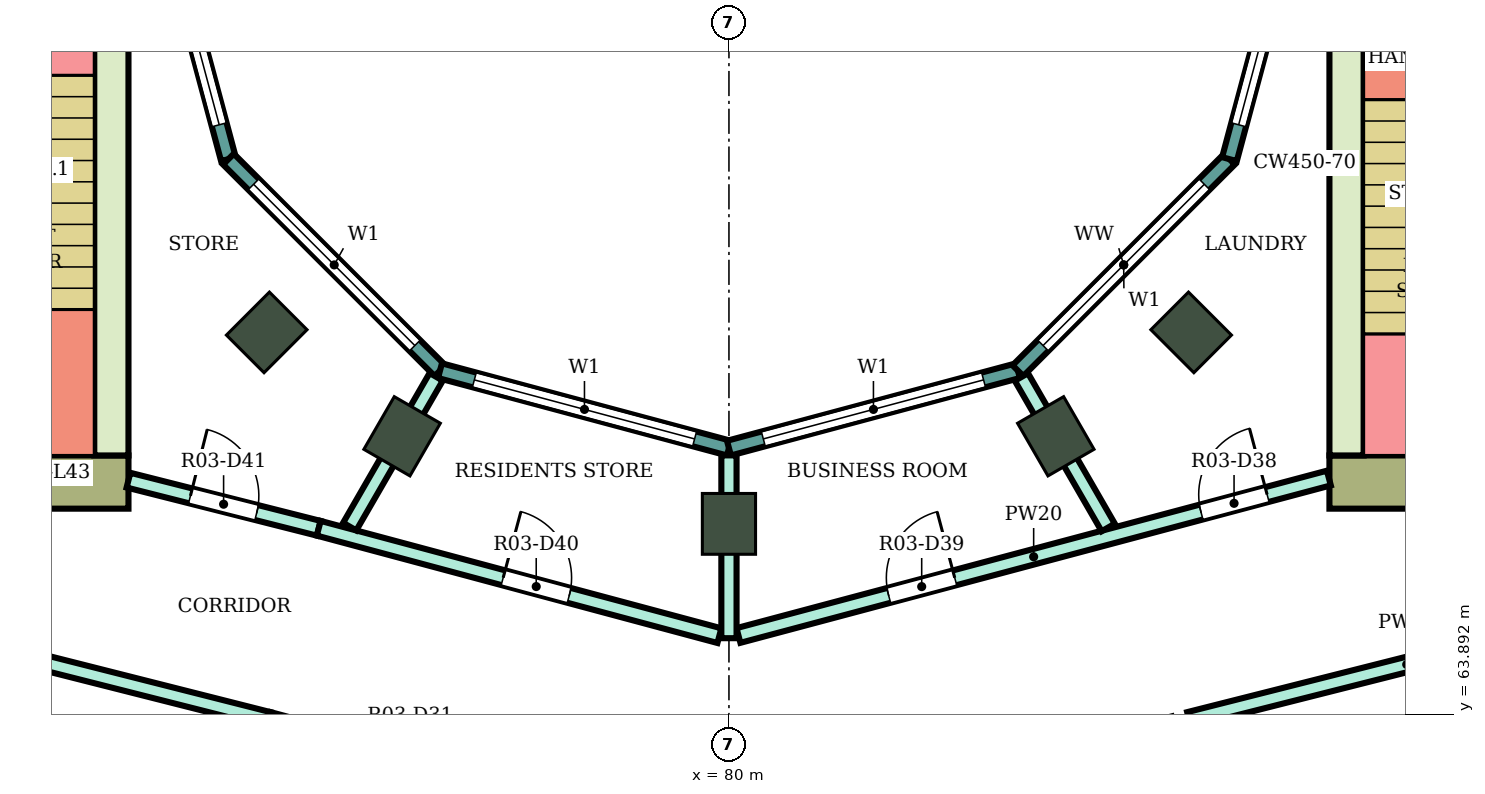
"""IFC4 building model, lengths in metres.
Left out: names, types, materials, properties, quantities, classifications, styles, units other than length and angle.
Written with IfcOpenShell. Run it as: python <this file> out.ifc"""

import sys

from ifc_helpers import new_model, si_unit, direction, frame, frame_2d, origin, origin_2d, place, context, subcontext, project, spatial, rectangle, extrude, element, fill, save


model = new_model("IFC4")
c1 = context("Model", 3, precision=1e-05, world=origin(), true_north=direction((0.0, 1.0)))
c2 = subcontext(c1, "Body", "Model", "MODEL_VIEW")
j1 = project(units=[si_unit("LENGTHUNIT", "METRE"), si_unit("PLANEANGLEUNIT", "RADIAN")], contexts=[c1])
p1 = place(None, origin())
s1 = spatial("IfcSite", under=j1, at=p1, CompositionType="ELEMENT")
p2 = place(p1, origin())
s2 = spatial("IfcBuilding", under=s1, at=p2, CompositionType="ELEMENT")
p3 = place(p2, frame((0.0, 0.0, 186.4)))
s3 = spatial("IfcBuildingStorey", under=s2, at=p3, CompositionType="ELEMENT", Elevation=186.4)
for number, where, z_axis, x_axis in (
    (1, (73.919, 68.919, 0.0), (0.0, 0.0, 1.0), (-0.707, -0.707, 0.0)),
    (2, (75.7, 67.552, 0.0), (0.0, 0.0, 1.0), (-0.5, -0.866, 0.0)),
    (3, (80.0, 66.4, 0.0), (0.0, 0.0, 1.0), (0.0, -1.0, 0.0)),
    (4, (84.3, 67.552, 0.0), (0.0, 0.0, 1.0), (0.5, -0.866, 0.0)),
    (5, (86.081, 68.919, 0.0), (0.0, 0.0, 1.0), (0.707, -0.707, 0.0)),
):
    element("IfcColumn", number, at=place(p3, frame(where, z_axis=z_axis, x_axis=x_axis)), inside=s3, PredefinedType="COLUMN", context=c2, shape_type="SweptSolid", body=[
        extrude(rectangle(XDim=0.8, YDim=0.7, at=origin_2d()), origin(), (0.0, 0.0, 1.0), 4.1),
    ])
p4 = place(p3, frame((87.9, 66.95, 0.0), z_axis=(0.0, 0.0, 1.0), x_axis=(1.0, 0.0, 0.0)))
e6 = element("IfcWall", 6, at=p4, inside=s3, PredefinedType="SHEAR", context=c2, shape_type="SweptSolid", body=[
    extrude(rectangle(XDim=14.8, YDim=0.7, at=frame_2d((7.4, 0.0))), origin(), (0.0, 0.0, 1.0), 3.78),
])
p5 = place(p4, frame((4.2, 0.0, 0.0)))
e7 = element("IfcOpeningElement", 7, at=p5, cuts=e6, PredefinedType="OPENING", context=c2, shape_type="SweptSolid", body=[
    extrude(rectangle(XDim=2.4, YDim=2.4, at=frame_2d((1.2, 1.2))), frame((0.0, 0.36, 0.0), z_axis=(0.0, -1.0, 0.0), x_axis=(1.0, 0.0, 0.0)), (0.0, 0.0, 1.0), 0.72),
])
p6 = place(p3, frame((88.125, 67.3, 0.0), z_axis=(0.0, 0.0, 1.0), x_axis=(0.0, 1.0, 0.0)))
e8 = element("IfcWall", 8, at=p6, inside=s3, PredefinedType="SHEAR", context=c2, shape_type="SweptSolid", body=[
    extrude(rectangle(XDim=7.7, YDim=0.45, at=frame_2d((3.85, 0.0))), origin(), (0.0, 0.0, 1.0), 3.78),
])
p7 = place(p3, frame((72.1, 66.95, 0.0), z_axis=(0.0, 0.0, 1.0), x_axis=(-1.0, 0.0, 0.0)))
e9 = element("IfcWall", 9, at=p7, inside=s3, PredefinedType="SHEAR", context=c2, shape_type="SweptSolid", body=[
    extrude(rectangle(XDim=14.8, YDim=0.7, at=frame_2d((7.4, 0.0))), origin(), (0.0, 0.0, 1.0), 3.78),
])
p8 = place(p7, frame((4.2, 0.0, 0.0)))
e10 = element("IfcOpeningElement", 10, at=p8, cuts=e9, PredefinedType="OPENING", context=c2, shape_type="SweptSolid", body=[
    extrude(rectangle(XDim=2.4, YDim=2.4, at=frame_2d((1.2, 1.2))), frame((0.0, 0.36, 0.0), z_axis=(0.0, -1.0, 0.0), x_axis=(1.0, 0.0, 0.0)), (0.0, 0.0, 1.0), 0.72),
])
p9 = place(p3, frame((71.875, 75.0, 0.0), z_axis=(0.0, 0.0, 1.0), x_axis=(0.0, -1.0, 0.0)))
e11 = element("IfcWall", 11, at=p9, inside=s3, PredefinedType="SHEAR", context=c2, shape_type="SweptSolid", body=[
    extrude(rectangle(XDim=7.7, YDim=0.45, at=frame_2d((3.85, 0.0))), origin(), (0.0, 0.0, 1.0), 3.78),
])
p10 = place(p3, frame((72.396, 75.0, 0.0), z_axis=(0.0, 0.0, 1.0), x_axis=(0.258789828301, -0.965933654434, 0.0)))
e12 = element("IfcWall", 12, at=p10, inside=s3, PredefinedType="NOTDEFINED", context=c2, shape_type="SweptSolid", body=[
    extrude(rectangle(XDim=3.936, YDim=0.2, at=frame_2d((1.968, 0.0))), origin(), (0.0, 0.0, 1.0), 4.1),
])
p11 = place(p10, frame((0.468, 0.0, 0.9)))
e13 = element("IfcOpeningElement", 13, at=p11, cuts=e12, PredefinedType="OPENING", context=c2, shape_type="SweptSolid", body=[
    extrude(rectangle(XDim=3.0, YDim=2.3, at=frame_2d((1.5, 1.15))), frame((0.0, 0.11, 0.0), z_axis=(0.0, -1.0, 0.0), x_axis=(1.0, 0.0, 0.0)), (0.0, 0.0, 1.0), 0.22),
])
p12 = place(p3, frame((73.415, 71.198, 0.0), z_axis=(0.0, 0.0, 1.0), x_axis=(0.707106781187, -0.707106781187, 0.0)))
e14 = element("IfcWall", 14, at=p12, inside=s3, PredefinedType="NOTDEFINED", context=c2, shape_type="SweptSolid", body=[
    extrude(rectangle(XDim=3.936, YDim=0.2, at=frame_2d((1.968, 0.0))), origin(), (0.0, 0.0, 1.0), 4.1),
])
p13 = place(p12, frame((0.468, 0.0, 0.9)))
e15 = element("IfcOpeningElement", 15, at=p13, cuts=e14, PredefinedType="OPENING", context=c2, shape_type="SweptSolid", body=[
    extrude(rectangle(XDim=3.0, YDim=2.3, at=frame_2d((1.5, 1.15))), frame((0.0, 0.11, 0.0), z_axis=(0.0, -1.0, 0.0), x_axis=(1.0, 0.0, 0.0)), (0.0, 0.0, 1.0), 0.22),
])
p14 = place(p3, frame((76.198, 68.415, 0.0), z_axis=(0.0, 0.0, 1.0), x_axis=(0.965933654434, -0.258789828301, 0.0)))
e16 = element("IfcWall", 16, at=p14, inside=s3, PredefinedType="NOTDEFINED", context=c2, shape_type="SweptSolid", body=[
    extrude(rectangle(XDim=3.936, YDim=0.2, at=frame_2d((1.968, 0.0))), origin(), (0.0, 0.0, 1.0), 4.1),
])
p15 = place(p14, frame((0.468, 0.0, 0.9)))
e17 = element("IfcOpeningElement", 17, at=p15, cuts=e16, PredefinedType="OPENING", context=c2, shape_type="SweptSolid", body=[
    extrude(rectangle(XDim=3.0, YDim=2.3, at=frame_2d((1.5, 1.15))), frame((0.0, 0.11, 0.0), z_axis=(0.0, -1.0, 0.0), x_axis=(1.0, 0.0, 0.0)), (0.0, 0.0, 1.0), 0.22),
])
p16 = place(p3, frame((80.0, 67.396, 0.0), z_axis=(0.0, 0.0, 1.0), x_axis=(0.965933654434, 0.258789828301, 0.0)))
e18 = element("IfcWall", 18, at=p16, inside=s3, PredefinedType="NOTDEFINED", context=c2, shape_type="SweptSolid", body=[
    extrude(rectangle(XDim=3.936, YDim=0.2, at=frame_2d((1.968, 0.0))), origin(), (0.0, 0.0, 1.0), 4.1),
])
p17 = place(p16, frame((0.468, 0.0, 0.9)))
e19 = element("IfcOpeningElement", 19, at=p17, cuts=e18, PredefinedType="OPENING", context=c2, shape_type="SweptSolid", body=[
    extrude(rectangle(XDim=3.0, YDim=2.3, at=frame_2d((1.5, 1.15))), frame((0.0, 0.11, 0.0), z_axis=(0.0, -1.0, 0.0), x_axis=(1.0, 0.0, 0.0)), (0.0, 0.0, 1.0), 0.22),
])
p18 = place(p3, frame((83.802, 68.415, 0.0), z_axis=(0.0, 0.0, 1.0), x_axis=(0.707106781187, 0.707106781187, 0.0)))
e20 = element("IfcWall", 20, at=p18, inside=s3, PredefinedType="NOTDEFINED", context=c2, shape_type="SweptSolid", body=[
    extrude(rectangle(XDim=3.936, YDim=0.2, at=frame_2d((1.968, 0.0))), origin(), (0.0, 0.0, 1.0), 4.1),
])
p19 = place(p18, frame((0.468, 0.0, 0.9)))
e21 = element("IfcOpeningElement", 21, at=p19, cuts=e20, PredefinedType="OPENING", context=c2, shape_type="SweptSolid", body=[
    extrude(rectangle(XDim=3.0, YDim=2.3, at=frame_2d((1.5, 1.15))), frame((0.0, 0.11, 0.0), z_axis=(0.0, -1.0, 0.0), x_axis=(1.0, 0.0, 0.0)), (0.0, 0.0, 1.0), 0.22),
])
p20 = place(p3, frame((86.585, 71.198, 0.0), z_axis=(0.0, 0.0, 1.0), x_axis=(0.258789828301, 0.965933654434, 0.0)))
e22 = element("IfcWall", 22, at=p20, inside=s3, PredefinedType="NOTDEFINED", context=c2, shape_type="SweptSolid", body=[
    extrude(rectangle(XDim=3.936, YDim=0.2, at=frame_2d((1.968, 0.0))), origin(), (0.0, 0.0, 1.0), 4.1),
])
p21 = place(p20, frame((0.468, 0.0, 0.9)))
e23 = element("IfcOpeningElement", 23, at=p21, cuts=e22, PredefinedType="OPENING", context=c2, shape_type="SweptSolid", body=[
    extrude(rectangle(XDim=3.0, YDim=2.3, at=frame_2d((1.5, 1.15))), frame((0.0, 0.11, 0.0), z_axis=(0.0, -1.0, 0.0), x_axis=(1.0, 0.0, 0.0)), (0.0, 0.0, 1.0), 0.22),
])
p22 = place(p3, frame((69.899, 64.85, 0.0), z_axis=(0.0, 0.0, 1.0), x_axis=(0.969429930153, -0.245368316057, 0.0)))
e24 = element("IfcWall", 24, at=p22, inside=s3, PredefinedType="PARTITIONING", context=c2, shape_type="SweptSolid", body=[
    extrude(rectangle(XDim=4.176, YDim=0.2, at=frame_2d((2.088, 0.0))), origin(), (0.0, 0.0, 1.0), 3.65),
])
p23 = place(p3, frame((72.1, 66.975, 0.0), z_axis=(0.0, 0.0, 1.0), x_axis=(0.969471314457, -0.245204752086, 0.0)))
e25 = element("IfcWall", 25, at=p23, inside=s3, PredefinedType="PARTITIONING", context=c2, shape_type="SweptSolid", body=[
    extrude(rectangle(XDim=2.582, YDim=0.2, at=frame_2d((1.291, 0.0))), origin(), (0.0, 0.0, 1.0), 3.65),
])
p24 = place(p23, frame((0.841, 0.0, 0.0)))
e26 = element("IfcOpeningElement", 26, at=p24, cuts=e25, PredefinedType="OPENING", context=c2, shape_type="SweptSolid", body=[
    extrude(rectangle(XDim=0.9, YDim=2.1, at=frame_2d((0.45, 1.05))), frame((0.0, 0.11, 0.0), z_axis=(0.0, -1.0, 0.0), x_axis=(1.0, 0.0, 0.0)), (0.0, 0.0, 1.0), 0.22),
])
p25 = place(p3, frame((73.947, 63.826, 0.0), z_axis=(0.0, 0.0, 1.0), x_axis=(0.965898432367, -0.258921258979, 0.0)))
e27 = element("IfcWall", 27, at=p25, inside=s3, PredefinedType="PARTITIONING", context=c2, shape_type="SweptSolid", body=[
    extrude(rectangle(XDim=6.217, YDim=0.2, at=frame_2d((3.108, 0.0))), origin(), (0.0, 0.0, 1.0), 3.65),
])
p26 = place(p25, frame((1.424, 0.0, 0.0)))
e28 = element("IfcOpeningElement", 28, at=p26, cuts=e27, PredefinedType="OPENING", context=c2, shape_type="SweptSolid", body=[
    extrude(rectangle(XDim=1.0, YDim=2.1, at=frame_2d((0.5, 1.05))), frame((0.0, 0.11, 0.0), z_axis=(0.0, -1.0, 0.0), x_axis=(1.0, 0.0, 0.0)), (0.0, 0.0, 1.0), 0.22),
])
p27 = place(p3, frame((74.603, 66.342, 0.0), z_axis=(0.0, 0.0, 1.0), x_axis=(0.965920893652, -0.258837453254, 0.0)))
e29 = element("IfcWall", 29, at=p27, inside=s3, PredefinedType="PARTITIONING", context=c2, shape_type="SweptSolid", body=[
    extrude(rectangle(XDim=5.458, YDim=0.2, at=frame_2d((2.729, 0.0))), origin(), (0.0, 0.0, 1.0), 3.65),
])
p28 = place(p27, frame((2.512, 0.0, 0.0)))
e30 = element("IfcOpeningElement", 30, at=p28, cuts=e29, PredefinedType="OPENING", context=c2, shape_type="SweptSolid", body=[
    extrude(rectangle(XDim=0.9, YDim=2.1, at=frame_2d((0.45, 1.05))), frame((0.0, 0.11, 0.0), z_axis=(0.0, -1.0, 0.0), x_axis=(1.0, 0.0, 0.0)), (0.0, 0.0, 1.0), 0.22),
])
p29 = place(p3, frame((75.01, 66.364, 0.0), z_axis=(0.0, 0.0, 1.0), x_axis=(0.500097042406, 0.865969369075, 0.0)))
e31 = element("IfcWall", 31, at=p29, inside=s3, PredefinedType="PARTITIONING", context=c2, shape_type="SweptSolid", body=[
    extrude(rectangle(XDim=2.275, YDim=0.2, at=frame_2d((1.138, 0.0))), origin(), (0.0, 0.0, 1.0), 3.65),
])
p30 = place(p3, frame((80.125, 64.932, 0.0), z_axis=(0.0, 0.0, 1.0), x_axis=(0.966236955806, 0.257655089674, 0.0)))
e32 = element("IfcWall", 32, at=p30, inside=s3, PredefinedType="PARTITIONING", context=c2, shape_type="SweptSolid", body=[
    extrude(rectangle(XDim=8.039, YDim=0.2, at=frame_2d((4.02, 0.0))), origin(), (0.0, 0.0, 1.0), 3.65),
])
p31 = place(p30, frame((6.298, 0.0, 0.0)))
e33 = element("IfcOpeningElement", 33, at=p31, cuts=e32, PredefinedType="OPENING", context=c2, shape_type="SweptSolid", body=[
    extrude(rectangle(XDim=0.9, YDim=2.1, at=frame_2d((0.45, 1.05))), frame((0.0, 0.11, 0.0), z_axis=(0.0, -1.0, 0.0), x_axis=(1.0, 0.0, 0.0)), (0.0, 0.0, 1.0), 0.22),
])
p32 = place(p30, frame((2.045, 0.0, 0.0)))
e34 = element("IfcOpeningElement", 34, at=p32, cuts=e32, PredefinedType="OPENING", context=c2, shape_type="SweptSolid", body=[
    extrude(rectangle(XDim=0.9, YDim=2.1, at=frame_2d((0.45, 1.05))), frame((0.0, 0.11, 0.0), z_axis=(0.0, -1.0, 0.0), x_axis=(1.0, 0.0, 0.0)), (0.0, 0.0, 1.0), 0.22),
])
p33 = place(p3, frame((80.0, 64.896, 0.0), z_axis=(0.0, 0.0, 1.0), x_axis=(0.0, 1.0, 0.0)))
e35 = element("IfcWall", 35, at=p33, inside=s3, PredefinedType="PARTITIONING", context=c2, shape_type="SweptSolid", body=[
    extrude(rectangle(XDim=2.405, YDim=0.2, at=frame_2d((1.203, 0.0))), origin(), (0.0, 0.0, 1.0), 3.65),
])
p34 = place(p3, frame((83.847, 68.332, 0.0), z_axis=(0.0, 0.0, 1.0), x_axis=(0.499953638813, -0.866052168773, 0.0)))
e36 = element("IfcWall", 36, at=p34, inside=s3, PredefinedType="PARTITIONING", context=c2, shape_type="SweptSolid", body=[
    extrude(rectangle(XDim=2.285, YDim=0.2, at=frame_2d((1.143, 0.0))), origin(), (0.0, 0.0, 1.0), 3.65),
])
p35 = place(p3, frame((86.053, 63.826, 0.0), z_axis=(0.0, 0.0, 1.0), x_axis=(0.969490004987, 0.245130843083, 0.0)))
e37 = element("IfcWall", 37, at=p35, inside=s3, PredefinedType="PARTITIONING", context=c2, shape_type="SweptSolid", body=[
    extrude(rectangle(XDim=5.908, YDim=0.2, at=frame_2d((2.954, 0.0))), origin(), (0.0, 0.0, 1.0), 3.65),
])
p36 = place(p11, origin())
e38 = element("IfcWindow", 38, at=p36, inside=s3, PartitioningType="SINGLE_PANEL", PredefinedType="WINDOW", context=c2, shape_type="SweptSolid", body=[
    extrude(rectangle(XDim=3.0, YDim=2.3, at=frame_2d((1.5, 1.15))), frame((0.0, 0.03, 0.0), z_axis=(0.0, -1.0, 0.0), x_axis=(1.0, 0.0, 0.0)), (0.0, 0.0, 1.0), 0.06),
])
fill(e13, e38)
p37 = place(p13, origin())
e39 = element("IfcWindow", 39, at=p37, inside=s3, PartitioningType="SINGLE_PANEL", PredefinedType="WINDOW", context=c2, shape_type="SweptSolid", body=[
    extrude(rectangle(XDim=3.0, YDim=2.3, at=frame_2d((1.5, 1.15))), frame((0.0, 0.03, 0.0), z_axis=(0.0, -1.0, 0.0), x_axis=(1.0, 0.0, 0.0)), (0.0, 0.0, 1.0), 0.06),
])
fill(e15, e39)
p38 = place(p15, origin())
e40 = element("IfcWindow", 40, at=p38, inside=s3, PartitioningType="SINGLE_PANEL", PredefinedType="WINDOW", context=c2, shape_type="SweptSolid", body=[
    extrude(rectangle(XDim=3.0, YDim=2.3, at=frame_2d((1.5, 1.15))), frame((0.0, 0.03, 0.0), z_axis=(0.0, -1.0, 0.0), x_axis=(1.0, 0.0, 0.0)), (0.0, 0.0, 1.0), 0.06),
])
fill(e17, e40)
p39 = place(p17, origin())
e41 = element("IfcWindow", 41, at=p39, inside=s3, PartitioningType="SINGLE_PANEL", PredefinedType="WINDOW", context=c2, shape_type="SweptSolid", body=[
    extrude(rectangle(XDim=3.0, YDim=2.3, at=frame_2d((1.5, 1.15))), frame((0.0, 0.03, 0.0), z_axis=(0.0, -1.0, 0.0), x_axis=(1.0, 0.0, 0.0)), (0.0, 0.0, 1.0), 0.06),
])
fill(e19, e41)
p40 = place(p19, origin())
e42 = element("IfcWindow", 42, at=p40, inside=s3, PartitioningType="SINGLE_PANEL", PredefinedType="WINDOW", context=c2, shape_type="SweptSolid", body=[
    extrude(rectangle(XDim=3.0, YDim=2.3, at=frame_2d((1.5, 1.15))), frame((0.0, 0.03, 0.0), z_axis=(0.0, -1.0, 0.0), x_axis=(1.0, 0.0, 0.0)), (0.0, 0.0, 1.0), 0.06),
])
fill(e21, e42)
p41 = place(p21, origin())
e43 = element("IfcWindow", 43, at=p41, inside=s3, PartitioningType="SINGLE_PANEL", PredefinedType="WINDOW", context=c2, shape_type="SweptSolid", body=[
    extrude(rectangle(XDim=3.0, YDim=2.3, at=frame_2d((1.5, 1.15))), frame((0.0, 0.03, 0.0), z_axis=(0.0, -1.0, 0.0), x_axis=(1.0, 0.0, 0.0)), (0.0, 0.0, 1.0), 0.06),
])
fill(e23, e43)
p42 = place(p31, origin())
e44 = element("IfcDoor", 44, at=p42, inside=s3, OperationType="SINGLE_SWING_RIGHT", PredefinedType="DOOR", context=c2, shape_type="SweptSolid", body=[
    extrude(rectangle(XDim=0.9, YDim=2.1, at=frame_2d((0.45, 1.05))), frame((0.0, 0.025, 0.0), z_axis=(0.0, -1.0, 0.0), x_axis=(1.0, 0.0, 0.0)), (0.0, 0.0, 1.0), 0.05),
])
fill(e33, e44)
p43 = place(p32, origin())
e45 = element("IfcDoor", 45, at=p43, inside=s3, OperationType="SINGLE_SWING_RIGHT", PredefinedType="DOOR", context=c2, shape_type="SweptSolid", body=[
    extrude(rectangle(XDim=0.9, YDim=2.1, at=frame_2d((0.45, 1.05))), frame((0.0, 0.025, 0.0), z_axis=(0.0, -1.0, 0.0), x_axis=(1.0, 0.0, 0.0)), (0.0, 0.0, 1.0), 0.05),
])
fill(e34, e45)
p44 = place(p28, origin())
e46 = element("IfcDoor", 46, at=p44, inside=s3, OperationType="SINGLE_SWING_LEFT", PredefinedType="DOOR", context=c2, shape_type="SweptSolid", body=[
    extrude(rectangle(XDim=0.9, YDim=2.1, at=frame_2d((0.45, 1.05))), frame((0.0, 0.025, 0.0), z_axis=(0.0, -1.0, 0.0), x_axis=(1.0, 0.0, 0.0)), (0.0, 0.0, 1.0), 0.05),
])
fill(e30, e46)
p45 = place(p24, origin())
e47 = element("IfcDoor", 47, at=p45, inside=s3, OperationType="SINGLE_SWING_LEFT", PredefinedType="DOOR", context=c2, shape_type="SweptSolid", body=[
    extrude(rectangle(XDim=0.9, YDim=2.1, at=frame_2d((0.45, 1.05))), frame((0.0, 0.025, 0.0), z_axis=(0.0, -1.0, 0.0), x_axis=(1.0, 0.0, 0.0)), (0.0, 0.0, 1.0), 0.05),
])
fill(e26, e47)
save(model, sys.argv[1])
